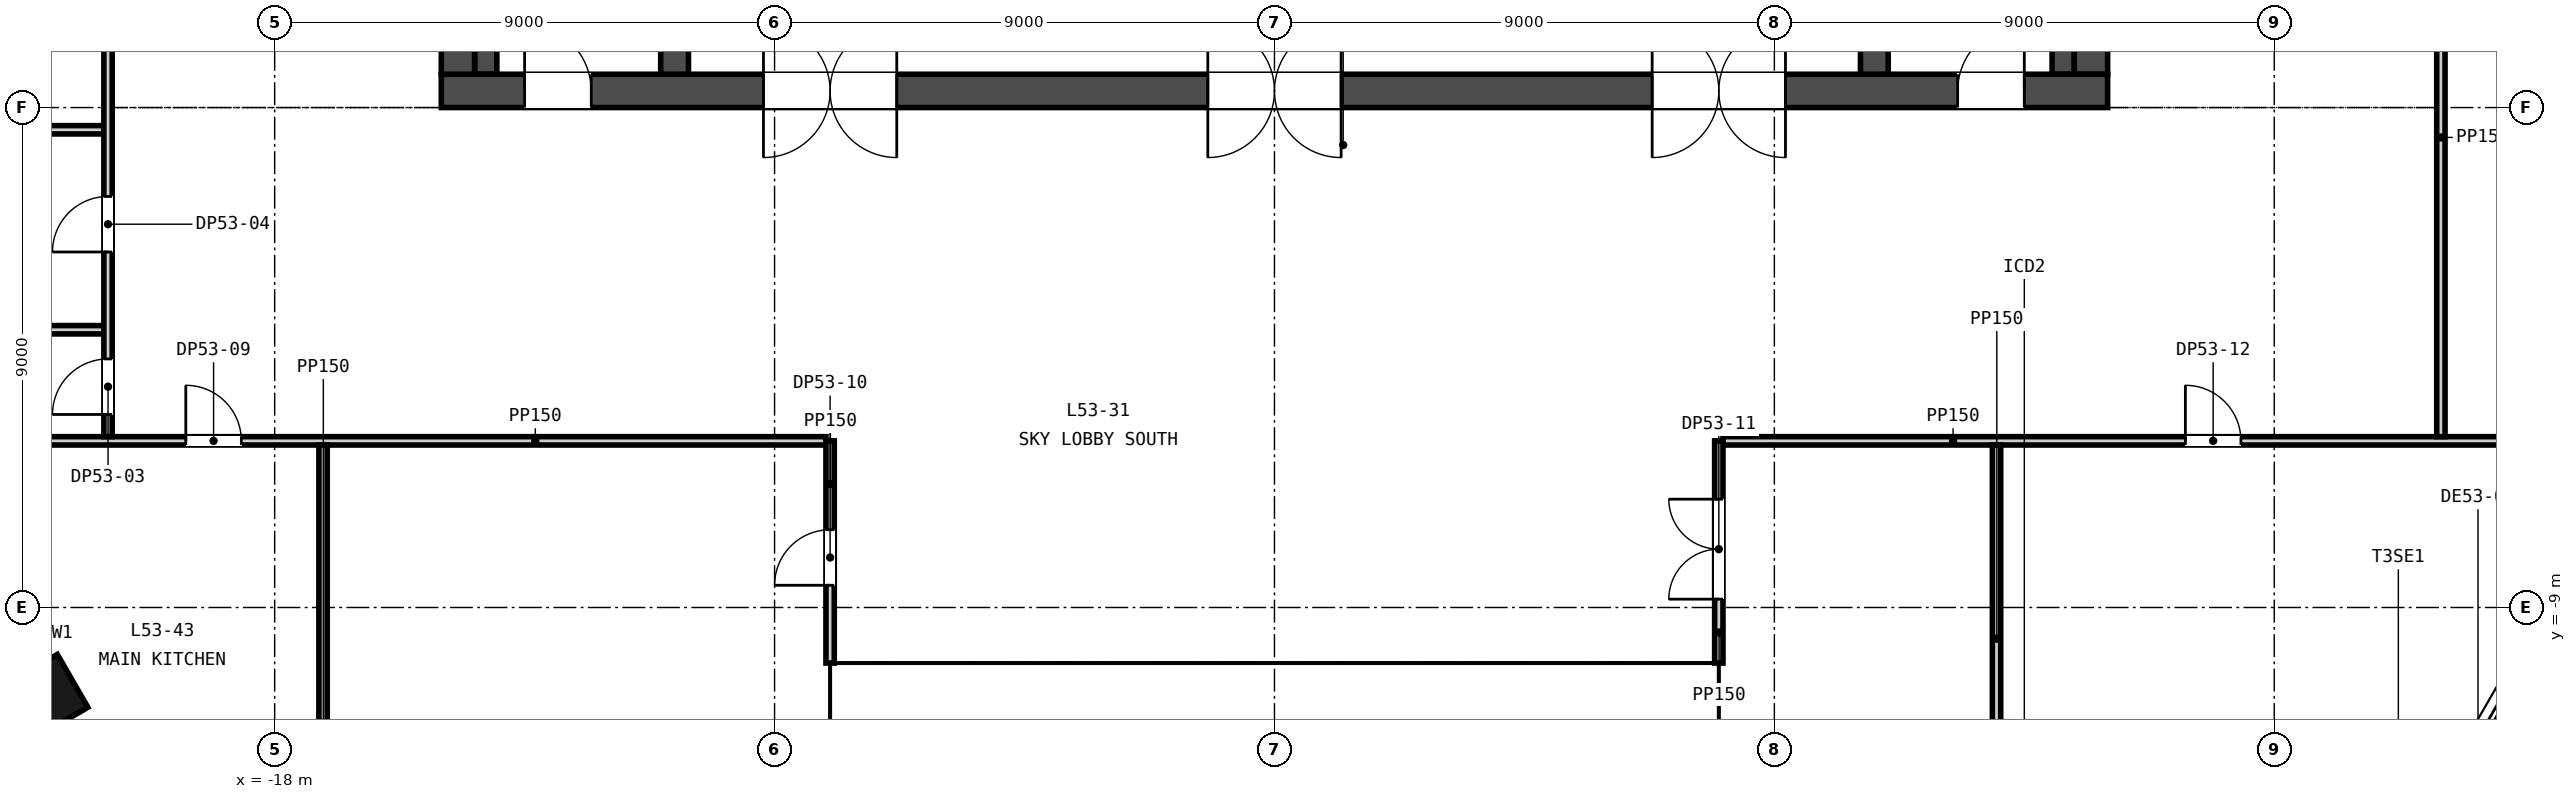
"""IFC4 building model, lengths in metres.
Left out: names, types, materials, properties, quantities, classifications, styles, units other than length and angle.
Written with IfcOpenShell. Run it as: python <this file> out.ifc"""

import sys

from ifc_helpers import new_model, si_unit, direction, frame, frame_2d, origin, origin_2d, place, context, subcontext, project, spatial, rectangle, extrude, element, fill, save


model = new_model("IFC4")
c1 = context("Model", 3, precision=1e-05, world=origin(), true_north=direction((0.0, 1.0)))
c2 = subcontext(c1, "Body", "Model", "MODEL_VIEW")
j1 = project(units=[si_unit("LENGTHUNIT", "METRE"), si_unit("PLANEANGLEUNIT", "RADIAN")], contexts=[c1])
p1 = place(None, origin())
s1 = spatial("IfcSite", under=j1, at=p1, CompositionType="ELEMENT")
p2 = place(p1, origin())
s2 = spatial("IfcBuilding", under=s1, at=p2, CompositionType="ELEMENT")
p3 = place(p2, frame((0.0, 0.0, 211.8)))
s3 = spatial("IfcBuildingStorey", under=s2, at=p3, CompositionType="ELEMENT", Elevation=211.8)
p4 = place(p3, frame((-15.0, 0.3, -0.3), z_axis=(0.0, 0.0, 1.0), x_axis=(1.0, 0.0, 0.0)))
e1 = element("IfcWall", 1, at=p4, inside=s3, PredefinedType="SOLIDWALL", context=c2, shape_type="SweptSolid", body=[
    extrude(rectangle(XDim=30.0, YDim=0.6, at=frame_2d((15.0, 0.0))), origin(), (0.0, 0.0, 1.0), 4.65),
])
p5 = place(p4, frame((5.8, 0.0, 0.3)))
e2 = element("IfcOpeningElement", 2, at=p5, cuts=e1, PredefinedType="OPENING", context=c2, shape_type="SweptSolid", body=[
    extrude(rectangle(XDim=2.4, YDim=2.4, at=frame_2d((1.2, 1.2))), frame((0.0, 0.31, 0.0), z_axis=(0.0, -1.0, 0.0), x_axis=(1.0, 0.0, 0.0)), (0.0, 0.0, 1.0), 0.62),
])
p6 = place(p4, frame((13.8, 0.0, 0.3)))
e3 = element("IfcOpeningElement", 3, at=p6, cuts=e1, PredefinedType="OPENING", context=c2, shape_type="SweptSolid", body=[
    extrude(rectangle(XDim=2.4, YDim=2.4, at=frame_2d((1.2, 1.2))), frame((0.0, 0.31, 0.0), z_axis=(0.0, -1.0, 0.0), x_axis=(1.0, 0.0, 0.0)), (0.0, 0.0, 1.0), 0.62),
])
p7 = place(p4, frame((21.8, 0.0, 0.3)))
e4 = element("IfcOpeningElement", 4, at=p7, cuts=e1, PredefinedType="OPENING", context=c2, shape_type="SweptSolid", body=[
    extrude(rectangle(XDim=2.4, YDim=2.4, at=frame_2d((1.2, 1.2))), frame((0.0, 0.31, 0.0), z_axis=(0.0, -1.0, 0.0), x_axis=(1.0, 0.0, 0.0)), (0.0, 0.0, 1.0), 0.62),
])
p8 = place(p4, frame((1.5, 0.0, 0.3)))
e5 = element("IfcOpeningElement", 5, at=p8, cuts=e1, PredefinedType="OPENING", context=c2, shape_type="SweptSolid", body=[
    extrude(rectangle(XDim=1.2, YDim=2.1, at=frame_2d((0.6, 1.05))), frame((0.0, 0.31, 0.0), z_axis=(0.0, -1.0, 0.0), x_axis=(1.0, 0.0, 0.0)), (0.0, 0.0, 1.0), 0.62),
])
p9 = place(p4, frame((27.3, 0.0, 0.3)))
e6 = element("IfcOpeningElement", 6, at=p9, cuts=e1, PredefinedType="OPENING", context=c2, shape_type="SweptSolid", body=[
    extrude(rectangle(XDim=1.2, YDim=2.1, at=frame_2d((0.6, 1.05))), frame((0.0, 0.31, 0.0), z_axis=(0.0, -1.0, 0.0), x_axis=(1.0, 0.0, 0.0)), (0.0, 0.0, 1.0), 0.62),
])
for number, where, z_axis, x_axis in (
    (7, (-14.7, 0.6, -0.3), (0.0, 0.0, 1.0), (0.0, 1.0, 0.0)),
    (8, (14.7, 0.6, -0.3), (0.0, 0.0, 1.0), (0.0, 1.0, 0.0)),
):
    element("IfcWall", number, at=place(p3, frame(where, z_axis=z_axis, x_axis=x_axis)), inside=s3, PredefinedType="SOLIDWALL", context=c2, shape_type="SweptSolid", body=[
        extrude(rectangle(XDim=13.8, YDim=0.6, at=frame_2d((6.9, 0.0))), origin(), (0.0, 0.0, 1.0), 4.65),
    ])
for number, where, z_axis, x_axis in (
    (9, (-10.8, 0.6, -0.3), (0.0, 0.0, 1.0), (0.0, 1.0, 0.0)),
    (10, (10.8, 0.6, -0.3), (0.0, 0.0, 1.0), (0.0, 1.0, 0.0)),
):
    element("IfcWall", number, at=place(p3, frame(where, z_axis=z_axis, x_axis=x_axis)), inside=s3, PredefinedType="SOLIDWALL", context=c2, shape_type="SweptSolid", body=[
        extrude(rectangle(XDim=13.8, YDim=0.5, at=frame_2d((6.9, 0.0))), origin(), (0.0, 0.0, 1.0), 4.65),
    ])
p10 = place(p3, frame((-22.115, -10.596, -0.3), z_axis=(0.0, 0.0, 1.0), x_axis=(0.5, -0.866025403784, 0.0)))
e11 = element("IfcColumn", 11, at=p10, inside=s3, PredefinedType="COLUMN", context=c2, shape_type="SweptSolid", body=[
    extrude(rectangle(XDim=1.1, YDim=1.1, at=origin_2d()), origin(), (0.0, 0.0, 1.0), 4.65),
])
p11 = place(p3, frame((20.466, -13.352, 0.0), z_axis=(0.0, 0.0, 1.0), x_axis=(0.49998164095, 0.866036003127, 0.0)))
e12 = element("IfcWall", 12, at=p11, inside=s3, PredefinedType="SOLIDWALL", context=c2, shape_type="SweptSolid", body=[
    extrude(rectangle(XDim=4.811, YDim=0.2, at=frame_2d((2.405, 0.0))), origin(), (0.0, 0.0, 1.0), 3.7),
])
p12 = place(p11, frame((1.505, 0.0, 0.0)))
e13 = element("IfcOpeningElement", 13, at=p12, cuts=e12, PredefinedType="OPENING", context=c2, shape_type="SweptSolid", body=[
    extrude(rectangle(XDim=1.8, YDim=2.4, at=frame_2d((0.9, 1.2))), frame((0.0, 0.11, 0.0), z_axis=(0.0, -1.0, 0.0), x_axis=(1.0, 0.0, 0.0)), (0.0, 0.0, 1.0), 0.22),
])
for number, where, z_axis, x_axis in (
    (14, (-14.2, 0.6, 0.0), (0.0, 0.0, 1.0), (0.0, 1.0, 0.0)),
    (15, (14.2, 0.6, 0.0), (0.0, 0.0, 1.0), (0.0, 1.0, 0.0)),
):
    element("IfcWall", number, at=place(p3, frame(where, z_axis=z_axis, x_axis=x_axis)), inside=s3, PredefinedType="SOLIDWALL", context=c2, shape_type="SweptSolid", body=[
        extrude(rectangle(XDim=13.8, YDim=0.4, at=frame_2d((6.9, 0.0))), origin(), (0.0, 0.0, 1.0), 4.35),
    ])
p13 = place(p3, frame((-24.09, -6.0, 0.0), z_axis=(0.0, 0.0, 1.0), x_axis=(1.0, 0.0, 0.0)))
e16 = element("IfcWall", 16, at=p13, inside=s3, PredefinedType="PARTITIONING", context=c2, shape_type="SweptSolid", body=[
    extrude(rectangle(XDim=16.015, YDim=0.15, at=frame_2d((8.007, 0.0))), origin(), (0.0, 0.0, 1.0), 4.35),
])
p14 = place(p13, frame((4.49, 0.0, 0.0)))
e17 = element("IfcOpeningElement", 17, at=p14, cuts=e16, PredefinedType="OPENING", context=c2, shape_type="SweptSolid", body=[
    extrude(rectangle(XDim=1.0, YDim=2.1, at=frame_2d((0.5, 1.05))), frame((0.0, 0.085, 0.0), z_axis=(0.0, -1.0, 0.0), x_axis=(1.0, 0.0, 0.0)), (0.0, 0.0, 1.0), 0.17),
])
p15 = place(p3, frame((8.075, -6.0, 0.0), z_axis=(0.0, 0.0, 1.0), x_axis=(1.0, 0.0, 0.0)))
e18 = element("IfcWall", 18, at=p15, inside=s3, PredefinedType="PARTITIONING", context=c2, shape_type="SweptSolid", body=[
    extrude(rectangle(XDim=16.415, YDim=0.15, at=frame_2d((8.208, 0.0))), origin(), (0.0, 0.0, 1.0), 4.35),
])
p16 = place(p15, frame((8.325, 0.0, 0.0)))
e19 = element("IfcOpeningElement", 19, at=p16, cuts=e18, PredefinedType="OPENING", context=c2, shape_type="SweptSolid", body=[
    extrude(rectangle(XDim=1.0, YDim=2.1, at=frame_2d((0.5, 1.05))), frame((0.0, 0.085, 0.0), z_axis=(0.0, -1.0, 0.0), x_axis=(1.0, 0.0, 0.0)), (0.0, 0.0, 1.0), 0.17),
])
p17 = place(p3, frame((-24.85, -4.0, 0.0), z_axis=(0.0, 0.0, 1.0), x_axis=(1.0, 0.0, 0.0)))
e20 = element("IfcWall", 20, at=p17, inside=s3, PredefinedType="PARTITIONING", context=c2, shape_type="SweptSolid", body=[
    extrude(rectangle(XDim=3.775, YDim=0.15, at=frame_2d((1.888, 0.0))), origin(), (0.0, 0.0, 1.0), 4.35),
])
p18 = place(p3, frame((-25.052, -0.4, 0.0), z_axis=(0.0, 0.0, 1.0), x_axis=(1.0, 0.0, 0.0)))
e21 = element("IfcWall", 21, at=p18, inside=s3, PredefinedType="PARTITIONING", context=c2, shape_type="SweptSolid", body=[
    extrude(rectangle(XDim=3.977, YDim=0.15, at=frame_2d((1.988, 0.0))), origin(), (0.0, 0.0, 1.0), 4.35),
])
p19 = place(p3, frame((-21.0, -5.925, 0.0), z_axis=(0.0, 0.0, 1.0), x_axis=(0.0, 1.0, 0.0)))
e22 = element("IfcWall", 22, at=p19, inside=s3, PredefinedType="PARTITIONING", context=c2, shape_type="SweptSolid", body=[
    extrude(rectangle(XDim=16.637, YDim=0.15, at=frame_2d((8.318, 0.0))), origin(), (0.0, 0.0, 1.0), 4.35),
])
p20 = place(p19, frame((0.4, 0.0, 0.0)))
e23 = element("IfcOpeningElement", 23, at=p20, cuts=e22, PredefinedType="OPENING", context=c2, shape_type="SweptSolid", body=[
    extrude(rectangle(XDim=1.0, YDim=2.1, at=frame_2d((0.5, 1.05))), frame((0.0, 0.085, 0.0), z_axis=(0.0, -1.0, 0.0), x_axis=(1.0, 0.0, 0.0)), (0.0, 0.0, 1.0), 0.17),
])
p21 = place(p19, frame((3.325, 0.0, 0.0)))
e24 = element("IfcOpeningElement", 24, at=p21, cuts=e22, PredefinedType="OPENING", context=c2, shape_type="SweptSolid", body=[
    extrude(rectangle(XDim=1.0, YDim=2.1, at=frame_2d((0.5, 1.05))), frame((0.0, 0.085, 0.0), z_axis=(0.0, -1.0, 0.0), x_axis=(1.0, 0.0, 0.0)), (0.0, 0.0, 1.0), 0.17),
])
p22 = place(p19, frame((7.075, 0.0, 0.0)))
e25 = element("IfcOpeningElement", 25, at=p22, cuts=e22, PredefinedType="OPENING", context=c2, shape_type="SweptSolid", body=[
    extrude(rectangle(XDim=1.0, YDim=2.1, at=frame_2d((0.5, 1.05))), frame((0.0, 0.085, 0.0), z_axis=(0.0, -1.0, 0.0), x_axis=(1.0, 0.0, 0.0)), (0.0, 0.0, 1.0), 0.17),
])
p23 = place(p19, frame((10.025, 0.0, 0.0)))
e26 = element("IfcOpeningElement", 26, at=p23, cuts=e22, PredefinedType="OPENING", context=c2, shape_type="SweptSolid", body=[
    extrude(rectangle(XDim=1.0, YDim=2.1, at=frame_2d((0.5, 1.05))), frame((0.0, 0.085, 0.0), z_axis=(0.0, -1.0, 0.0), x_axis=(1.0, 0.0, 0.0)), (0.0, 0.0, 1.0), 0.17),
])
p24 = place(p19, frame((13.825, 0.0, 0.0)))
e27 = element("IfcOpeningElement", 27, at=p24, cuts=e22, PredefinedType="OPENING", context=c2, shape_type="SweptSolid", body=[
    extrude(rectangle(XDim=1.0, YDim=2.1, at=frame_2d((0.5, 1.05))), frame((0.0, 0.085, 0.0), z_axis=(0.0, -1.0, 0.0), x_axis=(1.0, 0.0, 0.0)), (0.0, 0.0, 1.0), 0.17),
])
p25 = place(p3, frame((-17.129, -18.782, 0.0), z_axis=(0.0, 0.0, 1.0), x_axis=(0.0, 1.0, 0.0)))
e28 = element("IfcWall", 28, at=p25, inside=s3, PredefinedType="PARTITIONING", context=c2, shape_type="SweptSolid", body=[
    extrude(rectangle(XDim=12.707, YDim=0.15, at=frame_2d((6.354, 0.0))), origin(), (0.0, 0.0, 1.0), 4.35),
])
p26 = place(p3, frame((-8.0, -10.0, 0.0), z_axis=(0.0, 0.0, 1.0), x_axis=(0.0, 1.0, 0.0)))
e29 = element("IfcWall", 29, at=p26, inside=s3, PredefinedType="PARTITIONING", context=c2, shape_type="SweptSolid", body=[
    extrude(rectangle(XDim=4.0, YDim=0.15, at=frame_2d((2.0, 0.0))), origin(), (0.0, 0.0, 1.0), 3.601),
])
p27 = place(p26, frame((1.4, 0.0, 0.0)))
e30 = element("IfcOpeningElement", 30, at=p27, cuts=e29, PredefinedType="OPENING", context=c2, shape_type="SweptSolid", body=[
    extrude(rectangle(XDim=1.0, YDim=2.1, at=frame_2d((0.5, 1.05))), frame((0.0, 0.085, 0.0), z_axis=(0.0, -1.0, 0.0), x_axis=(1.0, 0.0, 0.0)), (0.0, 0.0, 1.0), 0.17),
])
p28 = place(p3, frame((8.0, -10.0, 0.0), z_axis=(0.0, 0.0, 1.0), x_axis=(0.0, 1.0, 0.0)))
e31 = element("IfcWall", 31, at=p28, inside=s3, PredefinedType="PARTITIONING", context=c2, shape_type="SweptSolid", body=[
    extrude(rectangle(XDim=4.0, YDim=0.15, at=frame_2d((2.0, 0.0))), origin(), (0.0, 0.0, 1.0), 3.744),
])
p29 = place(p28, frame((1.15, 0.0, 0.0)))
e32 = element("IfcOpeningElement", 32, at=p29, cuts=e31, PredefinedType="OPENING", context=c2, shape_type="SweptSolid", body=[
    extrude(rectangle(XDim=1.8, YDim=2.4, at=frame_2d((0.9, 1.2))), frame((0.0, 0.085, 0.0), z_axis=(0.0, -1.0, 0.0), x_axis=(1.0, 0.0, 0.0)), (0.0, 0.0, 1.0), 0.17),
])
p30 = place(p3, frame((13.0, -13.05, 0.0), z_axis=(0.0, 0.0, 1.0), x_axis=(0.0, 1.0, 0.0)))
e33 = element("IfcWall", 33, at=p30, inside=s3, PredefinedType="PARTITIONING", context=c2, shape_type="SweptSolid", body=[
    extrude(rectangle(XDim=6.975, YDim=0.15, at=frame_2d((3.488, 0.0))), origin(), (0.0, 0.0, 1.0), 4.35),
])
p31 = place(p3, frame((21.0, -5.925, 0.0), z_axis=(0.0, 0.0, 1.0), x_axis=(0.0, 1.0, 0.0)))
e34 = element("IfcWall", 34, at=p31, inside=s3, PredefinedType="PARTITIONING", context=c2, shape_type="SweptSolid", body=[
    extrude(rectangle(XDim=16.925, YDim=0.15, at=frame_2d((8.462, 0.0))), origin(), (0.0, 0.0, 1.0), 4.35),
])
p32 = place(p31, frame((10.825, 0.0, 0.0)))
e35 = element("IfcOpeningElement", 35, at=p32, cuts=e34, PredefinedType="OPENING", context=c2, shape_type="SweptSolid", body=[
    extrude(rectangle(XDim=1.0, YDim=2.1, at=frame_2d((0.5, 1.05))), frame((0.0, 0.085, 0.0), z_axis=(0.0, -1.0, 0.0), x_axis=(1.0, 0.0, 0.0)), (0.0, 0.0, 1.0), 0.17),
])
p33 = place(p12, origin())
e36 = element("IfcDoor", 36, at=p33, inside=s3, OperationType="SINGLE_SWING_LEFT", PredefinedType="DOOR", context=c2, shape_type="SweptSolid", body=[
    extrude(rectangle(XDim=1.8, YDim=2.4, at=frame_2d((0.9, 1.2))), frame((0.0, 0.025, 0.0), z_axis=(0.0, -1.0, 0.0), x_axis=(1.0, 0.0, 0.0)), (0.0, 0.0, 1.0), 0.05),
])
fill(e13, e36)
p34 = place(p5, origin())
e37 = element("IfcDoor", 37, at=p34, inside=s3, OperationType="DOUBLE_DOOR_DOUBLE_SWING", PredefinedType="DOOR", context=c2, shape_type="SweptSolid", body=[
    extrude(rectangle(XDim=2.4, YDim=2.4, at=frame_2d((1.2, 1.2))), frame((0.0, 0.025, 0.0), z_axis=(0.0, -1.0, 0.0), x_axis=(1.0, 0.0, 0.0)), (0.0, 0.0, 1.0), 0.05),
])
fill(e2, e37)
p35 = place(p6, origin())
e38 = element("IfcDoor", 38, at=p35, inside=s3, OperationType="DOUBLE_DOOR_DOUBLE_SWING", PredefinedType="DOOR", context=c2, shape_type="SweptSolid", body=[
    extrude(rectangle(XDim=2.4, YDim=2.4, at=frame_2d((1.2, 1.2))), frame((0.0, 0.025, 0.0), z_axis=(0.0, -1.0, 0.0), x_axis=(1.0, 0.0, 0.0)), (0.0, 0.0, 1.0), 0.05),
])
fill(e3, e38)
p36 = place(p7, origin())
e39 = element("IfcDoor", 39, at=p36, inside=s3, OperationType="DOUBLE_DOOR_DOUBLE_SWING", PredefinedType="DOOR", context=c2, shape_type="SweptSolid", body=[
    extrude(rectangle(XDim=2.4, YDim=2.4, at=frame_2d((1.2, 1.2))), frame((0.0, 0.025, 0.0), z_axis=(0.0, -1.0, 0.0), x_axis=(1.0, 0.0, 0.0)), (0.0, 0.0, 1.0), 0.05),
])
fill(e4, e39)
p37 = place(p8, origin())
e40 = element("IfcDoor", 40, at=p37, inside=s3, OperationType="SINGLE_SWING_LEFT", PredefinedType="DOOR", context=c2, shape_type="SweptSolid", body=[
    extrude(rectangle(XDim=1.2, YDim=2.1, at=frame_2d((0.6, 1.05))), frame((0.0, 0.025, 0.0), z_axis=(0.0, -1.0, 0.0), x_axis=(1.0, 0.0, 0.0)), (0.0, 0.0, 1.0), 0.05),
])
fill(e5, e40)
p38 = place(p9, origin())
e41 = element("IfcDoor", 41, at=p38, inside=s3, OperationType="SINGLE_SWING_RIGHT", PredefinedType="DOOR", context=c2, shape_type="SweptSolid", body=[
    extrude(rectangle(XDim=1.2, YDim=2.1, at=frame_2d((0.6, 1.05))), frame((0.0, 0.025, 0.0), z_axis=(0.0, -1.0, 0.0), x_axis=(1.0, 0.0, 0.0)), (0.0, 0.0, 1.0), 0.05),
])
fill(e6, e41)
p39 = place(p20, origin())
e42 = element("IfcDoor", 42, at=p39, inside=s3, OperationType="SINGLE_SWING_LEFT", PredefinedType="DOOR", context=c2, shape_type="SweptSolid", body=[
    extrude(rectangle(XDim=1.0, YDim=2.1, at=frame_2d((0.5, 1.05))), frame((0.0, 0.025, 0.0), z_axis=(0.0, -1.0, 0.0), x_axis=(1.0, 0.0, 0.0)), (0.0, 0.0, 1.0), 0.05),
])
fill(e23, e42)
p40 = place(p21, origin())
e43 = element("IfcDoor", 43, at=p40, inside=s3, OperationType="SINGLE_SWING_LEFT", PredefinedType="DOOR", context=c2, shape_type="SweptSolid", body=[
    extrude(rectangle(XDim=1.0, YDim=2.1, at=frame_2d((0.5, 1.05))), frame((0.0, 0.025, 0.0), z_axis=(0.0, -1.0, 0.0), x_axis=(1.0, 0.0, 0.0)), (0.0, 0.0, 1.0), 0.05),
])
fill(e24, e43)
p41 = place(p14, origin())
e44 = element("IfcDoor", 44, at=p41, inside=s3, OperationType="SINGLE_SWING_LEFT", PredefinedType="DOOR", context=c2, shape_type="SweptSolid", body=[
    extrude(rectangle(XDim=1.0, YDim=2.1, at=frame_2d((0.5, 1.05))), frame((0.0, 0.025, 0.0), z_axis=(0.0, -1.0, 0.0), x_axis=(1.0, 0.0, 0.0)), (0.0, 0.0, 1.0), 0.05),
])
fill(e17, e44)
p42 = place(p27, origin())
e45 = element("IfcDoor", 45, at=p42, inside=s3, OperationType="SINGLE_SWING_LEFT", PredefinedType="DOOR", context=c2, shape_type="SweptSolid", body=[
    extrude(rectangle(XDim=1.0, YDim=2.1, at=frame_2d((0.5, 1.05))), frame((0.0, 0.025, 0.0), z_axis=(0.0, -1.0, 0.0), x_axis=(1.0, 0.0, 0.0)), (0.0, 0.0, 1.0), 0.05),
])
fill(e30, e45)
p43 = place(p29, origin())
e46 = element("IfcDoor", 46, at=p43, inside=s3, OperationType="SINGLE_SWING_LEFT", PredefinedType="DOOR", context=c2, shape_type="SweptSolid", body=[
    extrude(rectangle(XDim=1.8, YDim=2.4, at=frame_2d((0.9, 1.2))), frame((0.0, 0.025, 0.0), z_axis=(0.0, -1.0, 0.0), x_axis=(1.0, 0.0, 0.0)), (0.0, 0.0, 1.0), 0.05),
])
fill(e32, e46)
p44 = place(p16, origin())
e47 = element("IfcDoor", 47, at=p44, inside=s3, OperationType="SINGLE_SWING_LEFT", PredefinedType="DOOR", context=c2, shape_type="SweptSolid", body=[
    extrude(rectangle(XDim=1.0, YDim=2.1, at=frame_2d((0.5, 1.05))), frame((0.0, 0.025, 0.0), z_axis=(0.0, -1.0, 0.0), x_axis=(1.0, 0.0, 0.0)), (0.0, 0.0, 1.0), 0.05),
])
fill(e19, e47)
save(model, sys.argv[1])
